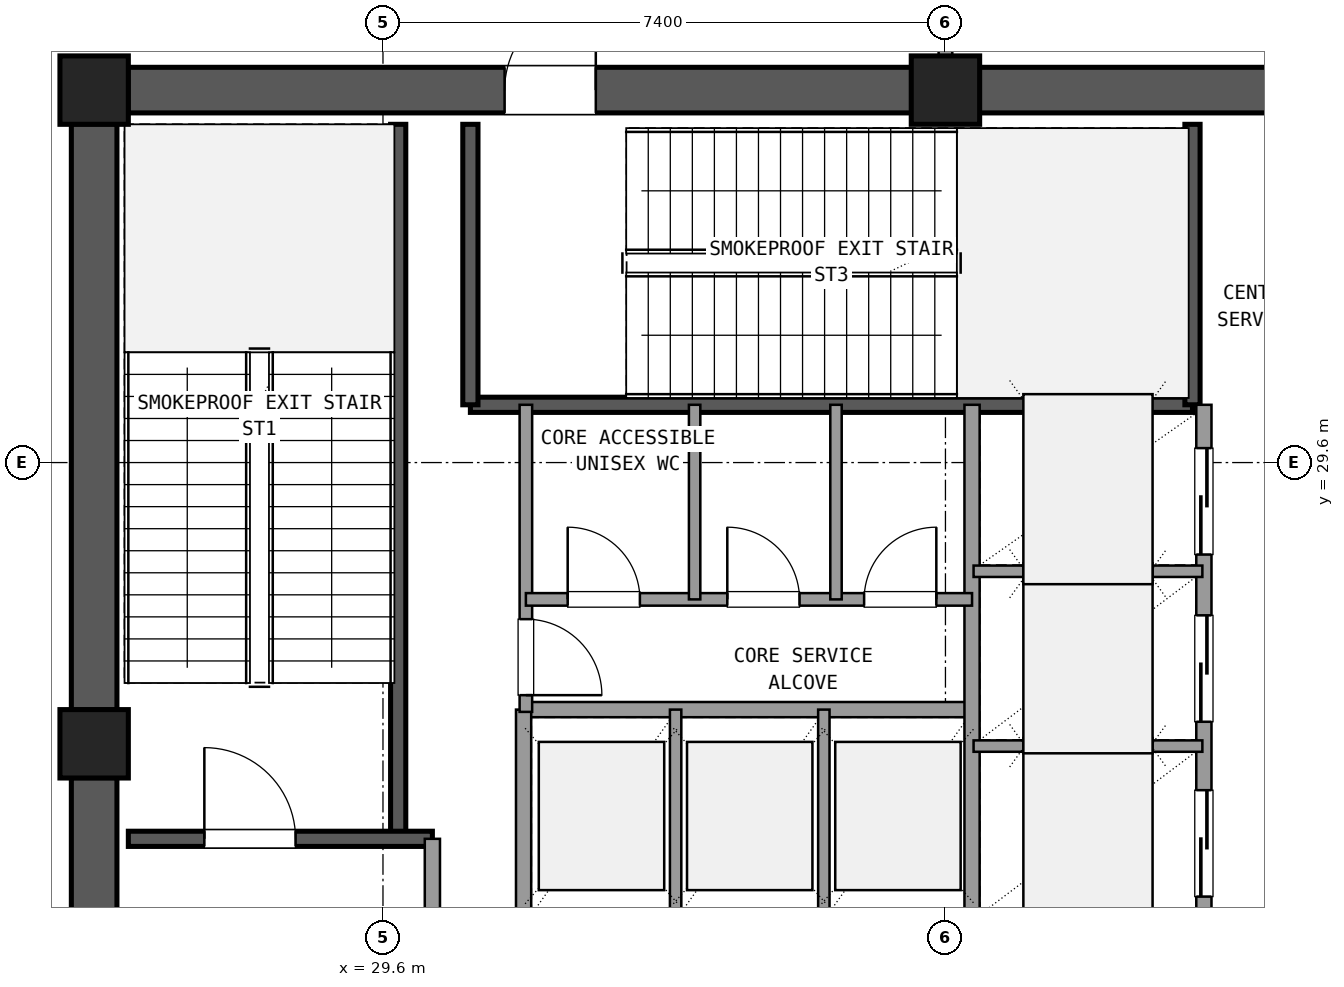
"""IFC4 building model, lengths in metres.
Left out: names, types, materials, properties, quantities, classifications, styles, units other than length and angle.
Written with IfcOpenShell. Run it as: python <this file> out.ifc"""

import sys

from ifc_helpers import new_model, si_unit, direction, frame, frame_2d, origin, origin_2d, place, context, subcontext, project, spatial, rectangle, extrude, element, fill, save


model = new_model("IFC4")
c1 = context("Model", 3, precision=1e-05, world=origin(), true_north=direction((0.0, 1.0)))
c2 = subcontext(c1, "Body", "Model", "MODEL_VIEW")
j1 = project(units=[si_unit("LENGTHUNIT", "METRE"), si_unit("PLANEANGLEUNIT", "RADIAN")], contexts=[c1])
p1 = place(None, origin())
s1 = spatial("IfcSite", under=j1, at=p1, CompositionType="ELEMENT")
p2 = place(p1, origin())
s2 = spatial("IfcBuilding", under=s1, at=p2, CompositionType="ELEMENT")
p3 = place(p2, frame((0.0, 0.0, 182.7)))
s3 = spatial("IfcBuildingStorey", under=s2, at=p3, CompositionType="ELEMENT", Elevation=182.7)
for number, where, z_axis, x_axis in (
    (1, (37.0, 34.5, 0.0), (0.0, 0.0, 1.0), (1.0, 0.0, 0.0)),
    (2, (25.8, 34.5, 0.0), (0.0, 0.0, 1.0), (1.0, 0.0, 0.0)),
    (3, (25.8, 25.9, 0.0), (0.0, 0.0, 1.0), (1.0, 0.0, 0.0)),
):
    element("IfcColumn", number, at=place(p3, frame(where, z_axis=z_axis, x_axis=x_axis)), inside=s3, PredefinedType="COLUMN", context=c2, shape_type="SweptSolid", body=[
        extrude(rectangle(XDim=0.9, YDim=0.9, at=origin_2d()), origin(), (0.0, 0.0, 1.0), 5.76),
    ])
p4 = place(p3, frame((47.755, 34.5, 0.0), z_axis=(0.0, 0.0, 1.0), x_axis=(-1.0, 0.0, 0.0)))
e4 = element("IfcWall", 4, at=p4, inside=s3, PredefinedType="SHEAR", context=c2, shape_type="SweptSolid", body=[
    extrude(rectangle(XDim=10.31, YDim=0.6, at=frame_2d((5.155, 0.0))), origin(), (0.0, 0.0, 1.0), 5.46),
])
p5 = place(p4, frame((4.655, 0.0, 0.0)))
e5 = element("IfcOpeningElement", 5, at=p5, cuts=e4, PredefinedType="OPENING", context=c2, shape_type="SweptSolid", body=[
    extrude(rectangle(XDim=1.6, YDim=2.2, at=frame_2d((0.8, 1.1))), frame((0.0, 0.31, 0.0), z_axis=(0.0, -1.0, 0.0), x_axis=(1.0, 0.0, 0.0)), (0.0, 0.0, 1.0), 0.62),
])
p6 = place(p3, frame((36.555, 34.5, 0.0), z_axis=(0.0, 0.0, 1.0), x_axis=(-1.0, 0.0, 0.0)))
e6 = element("IfcWall", 6, at=p6, inside=s3, PredefinedType="SHEAR", context=c2, shape_type="SweptSolid", body=[
    extrude(rectangle(XDim=10.31, YDim=0.6, at=frame_2d((5.155, 0.0))), origin(), (0.0, 0.0, 1.0), 5.46),
])
p7 = place(p6, frame((4.155, 0.0, 0.0)))
e7 = element("IfcOpeningElement", 7, at=p7, cuts=e6, PredefinedType="OPENING", context=c2, shape_type="SweptSolid", body=[
    extrude(rectangle(XDim=1.2, YDim=2.15, at=frame_2d((0.6, 1.075))), frame((0.0, 0.31, 0.0), z_axis=(0.0, -1.0, 0.0), x_axis=(1.0, 0.0, 0.0)), (0.0, 0.0, 1.0), 0.62),
])
p8 = place(p3, frame((25.8, 34.055, 0.0), z_axis=(0.0, 0.0, 1.0), x_axis=(0.0, -1.0, 0.0)))
e8 = element("IfcWall", 8, at=p8, inside=s3, PredefinedType="SHEAR", context=c2, shape_type="SweptSolid", body=[
    extrude(rectangle(XDim=7.71, YDim=0.6, at=frame_2d((3.855, 0.0))), origin(), (0.0, 0.0, 1.0), 5.46),
])
p9 = place(p3, frame((25.8, 25.455, 0.0), z_axis=(0.0, 0.0, 1.0), x_axis=(0.0, -1.0, 0.0)))
e9 = element("IfcWall", 9, at=p9, inside=s3, PredefinedType="SHEAR", context=c2, shape_type="SweptSolid", body=[
    extrude(rectangle(XDim=7.71, YDim=0.6, at=frame_2d((3.855, 0.0))), origin(), (0.0, 0.0, 1.0), 5.46),
])
p10 = place(p9, frame((2.205, 0.0, 0.0)))
e10 = element("IfcOpeningElement", 10, at=p10, cuts=e9, PredefinedType="OPENING", context=c2, shape_type="SweptSolid", body=[
    extrude(rectangle(XDim=1.2, YDim=2.15, at=frame_2d((0.6, 1.075))), frame((0.0, 0.31, 0.0), z_axis=(0.0, -1.0, 0.0), x_axis=(1.0, 0.0, 0.0)), (0.0, 0.0, 1.0), 0.62),
])
p11 = place(p3, frame((29.8, 24.65, 0.0), z_axis=(0.0, 0.0, 1.0), x_axis=(0.0, 1.0, 0.0)))
e11 = element("IfcWall", 11, at=p11, inside=s3, PredefinedType="SHEAR", context=c2, shape_type="SweptSolid", body=[
    extrude(rectangle(XDim=9.4, YDim=0.2, at=frame_2d((4.7, 0.0))), origin(), (0.0, 0.0, 1.0), 5.46),
])
p12 = place(p3, frame((26.25, 24.65, 0.0), z_axis=(0.0, 0.0, 1.0), x_axis=(1.0, 0.0, 0.0)))
e12 = element("IfcWall", 12, at=p12, inside=s3, PredefinedType="SHEAR", context=c2, shape_type="SweptSolid", body=[
    extrude(rectangle(XDim=4.0, YDim=0.2, at=frame_2d((2.0, 0.0))), origin(), (0.0, 0.0, 1.0), 5.46),
])
p13 = place(p12, frame((1.0, 0.0, 0.0)))
e13 = element("IfcOpeningElement", 13, at=p13, cuts=e12, PredefinedType="OPENING", context=c2, shape_type="SweptSolid", body=[
    extrude(rectangle(XDim=1.2, YDim=2.15, at=frame_2d((0.6, 1.075))), frame((0.0, 0.11, 0.0), z_axis=(0.0, -1.0, 0.0), x_axis=(1.0, 0.0, 0.0)), (0.0, 0.0, 1.0), 0.22),
])
p14 = place(p3, frame((30.75, 30.36, 0.0), z_axis=(0.0, 0.0, 1.0), x_axis=(1.0, 0.0, 0.0)))
e14 = element("IfcWall", 14, at=p14, inside=s3, PredefinedType="SHEAR", context=c2, shape_type="SweptSolid", body=[
    extrude(rectangle(XDim=9.5, YDim=0.2, at=frame_2d((4.75, 0.0))), origin(), (0.0, 0.0, 1.0), 5.46),
])
for number, where, z_axis, x_axis in (
    (15, (30.75, 30.36, 0.0), (0.0, 0.0, 1.0), (0.0, 1.0, 0.0)),
    (16, (40.25, 30.36, 0.0), (0.0, 0.0, 1.0), (0.0, 1.0, 0.0)),
):
    element("IfcWall", number, at=place(p3, frame(where, z_axis=z_axis, x_axis=x_axis)), inside=s3, PredefinedType="SHEAR", context=c2, shape_type="SweptSolid", body=[
        extrude(rectangle(XDim=3.69, YDim=0.2, at=frame_2d((1.845, 0.0))), origin(), (0.0, 0.0, 1.0), 5.46),
    ])
p15 = place(p3, frame((30.25, 17.75, 0.0), z_axis=(0.0, 0.0, 1.0), x_axis=(0.0, 1.0, 0.0)))
e17 = element("IfcWall", 17, at=p15, inside=s3, PredefinedType="SOLIDWALL", context=c2, shape_type="SweptSolid", body=[
    extrude(rectangle(XDim=6.9, YDim=0.2, at=frame_2d((3.45, 0.0))), origin(), (0.0, 0.0, 1.0), 4.37),
])
p16 = place(p15, frame((4.15, 0.0, 0.0)))
e18 = element("IfcOpeningElement", 18, at=p16, cuts=e17, PredefinedType="OPENING", context=c2, shape_type="SweptSolid", body=[
    extrude(rectangle(XDim=1.2, YDim=2.15, at=frame_2d((0.6, 1.075))), frame((0.0, 0.11, 0.0), z_axis=(0.0, -1.0, 0.0), x_axis=(1.0, 0.0, 0.0)), (0.0, 0.0, 1.0), 0.22),
])
p17 = place(p3, frame((31.45, 26.35, 0.0), z_axis=(0.0, 0.0, 1.0), x_axis=(1.0, 0.0, 0.0)))
e19 = element("IfcWall", 19, at=p17, inside=s3, PredefinedType="SOLIDWALL", context=c2, shape_type="SweptSolid", body=[
    extrude(rectangle(XDim=5.9, YDim=0.2, at=frame_2d((2.95, 0.0))), origin(), (0.0, 0.0, 1.0), 4.37),
])
p18 = place(p3, frame((31.45, 23.54, 0.0), z_axis=(0.0, 0.0, 1.0), x_axis=(0.0, 1.0, 0.0)))
e20 = element("IfcWall", 20, at=p18, inside=s3, PredefinedType="SOLIDWALL", context=c2, shape_type="SweptSolid", body=[
    extrude(rectangle(XDim=2.81, YDim=0.2, at=frame_2d((1.405, 0.0))), origin(), (0.0, 0.0, 1.0), 4.37),
])
for number, where, z_axis, x_axis in (
    (21, (33.45, 23.54, 0.0), (0.0, 0.0, 1.0), (0.0, 1.0, 0.0)),
    (22, (35.4, 23.54, 0.0), (0.0, 0.0, 1.0), (0.0, 1.0, 0.0)),
):
    element("IfcWall", number, at=place(p3, frame(where, z_axis=z_axis, x_axis=x_axis)), inside=s3, PredefinedType="PARTITIONING", context=c2, shape_type="SweptSolid", body=[
        extrude(rectangle(XDim=2.81, YDim=0.15, at=frame_2d((1.405, 0.0))), origin(), (0.0, 0.0, 1.0), 4.37),
    ])
p19 = place(p3, frame((37.35, 23.54, 0.0), z_axis=(0.0, 0.0, 1.0), x_axis=(0.0, 1.0, 0.0)))
e23 = element("IfcWall", 23, at=p19, inside=s3, PredefinedType="SOLIDWALL", context=c2, shape_type="SweptSolid", body=[
    extrude(rectangle(XDim=6.82, YDim=0.2, at=frame_2d((3.41, 0.0))), origin(), (0.0, 0.0, 1.0), 4.37),
])
p20 = place(p3, frame((40.4, 23.54, 0.0), z_axis=(0.0, 0.0, 1.0), x_axis=(0.0, 1.0, 0.0)))
e24 = element("IfcWall", 24, at=p20, inside=s3, PredefinedType="SOLIDWALL", context=c2, shape_type="SweptSolid", body=[
    extrude(rectangle(XDim=6.82, YDim=0.2, at=frame_2d((3.41, 0.0))), origin(), (0.0, 0.0, 1.0), 4.37),
])
p21 = place(p20, frame((0.35, 0.0, 0.0)))
e25 = element("IfcOpeningElement", 25, at=p21, cuts=e24, PredefinedType="OPENING", context=c2, shape_type="SweptSolid", body=[
    extrude(rectangle(XDim=1.4, YDim=2.2, at=frame_2d((0.7, 1.1))), frame((0.0, 0.11, 0.0), z_axis=(0.0, -1.0, 0.0), x_axis=(1.0, 0.0, 0.0)), (0.0, 0.0, 1.0), 0.22),
])
p22 = place(p20, frame((2.65, 0.0, 0.0)))
e26 = element("IfcOpeningElement", 26, at=p22, cuts=e24, PredefinedType="OPENING", context=c2, shape_type="SweptSolid", body=[
    extrude(rectangle(XDim=1.4, YDim=2.2, at=frame_2d((0.7, 1.1))), frame((0.0, 0.11, 0.0), z_axis=(0.0, -1.0, 0.0), x_axis=(1.0, 0.0, 0.0)), (0.0, 0.0, 1.0), 0.22),
])
p23 = place(p20, frame((4.85, 0.0, 0.0)))
e27 = element("IfcOpeningElement", 27, at=p23, cuts=e24, PredefinedType="OPENING", context=c2, shape_type="SweptSolid", body=[
    extrude(rectangle(XDim=1.4, YDim=2.2, at=frame_2d((0.7, 1.1))), frame((0.0, 0.11, 0.0), z_axis=(0.0, -1.0, 0.0), x_axis=(1.0, 0.0, 0.0)), (0.0, 0.0, 1.0), 0.22),
])
for number, where, z_axis, x_axis in (
    (28, (37.37, 25.87, 0.0), (0.0, 0.0, 1.0), (1.0, 0.0, 0.0)),
    (29, (37.37, 28.17, 0.0), (0.0, 0.0, 1.0), (1.0, 0.0, 0.0)),
):
    element("IfcWall", number, at=place(p3, frame(where, z_axis=z_axis, x_axis=x_axis)), inside=s3, PredefinedType="PARTITIONING", context=c2, shape_type="SweptSolid", body=[
        extrude(rectangle(XDim=3.01, YDim=0.15, at=frame_2d((1.505, 0.0))), origin(), (0.0, 0.0, 1.0), 4.37),
    ])
p24 = place(p3, frame((31.48, 26.32, 0.0), z_axis=(0.0, 0.0, 1.0), x_axis=(0.0, 1.0, 0.0)))
e30 = element("IfcWall", 30, at=p24, inside=s3, PredefinedType="PLUMBINGWALL", context=c2, shape_type="SweptSolid", body=[
    extrude(rectangle(XDim=4.04, YDim=0.165, at=frame_2d((2.02, 0.0))), origin(), (0.0, 0.0, 1.0), 4.37),
])
p25 = place(p24, frame((0.22, 0.0, 0.0)))
e31 = element("IfcOpeningElement", 31, at=p25, cuts=e30, PredefinedType="OPENING", context=c2, shape_type="SweptSolid", body=[
    extrude(rectangle(XDim=1.0, YDim=2.15, at=frame_2d((0.5, 1.075))), frame((0.0, 0.093, 0.0), z_axis=(0.0, -1.0, 0.0), x_axis=(1.0, 0.0, 0.0)), (0.0, 0.0, 1.0), 0.185),
])
p26 = place(p3, frame((31.48, 27.8, 0.0), z_axis=(0.0, 0.0, 1.0), x_axis=(1.0, 0.0, 0.0)))
e32 = element("IfcWall", 32, at=p26, inside=s3, PredefinedType="PLUMBINGWALL", context=c2, shape_type="SweptSolid", body=[
    extrude(rectangle(XDim=5.87, YDim=0.165, at=frame_2d((2.935, 0.0))), origin(), (0.0, 0.0, 1.0), 4.37),
])
p27 = place(p26, frame((0.55, 0.0, 0.0)))
e33 = element("IfcOpeningElement", 33, at=p27, cuts=e32, PredefinedType="OPENING", context=c2, shape_type="SweptSolid", body=[
    extrude(rectangle(XDim=0.95, YDim=2.1, at=frame_2d((0.475, 1.05))), frame((0.0, 0.093, 0.0), z_axis=(0.0, -1.0, 0.0), x_axis=(1.0, 0.0, 0.0)), (0.0, 0.0, 1.0), 0.185),
])
p28 = place(p26, frame((2.65, 0.0, 0.0)))
e34 = element("IfcOpeningElement", 34, at=p28, cuts=e32, PredefinedType="OPENING", context=c2, shape_type="SweptSolid", body=[
    extrude(rectangle(XDim=0.95, YDim=2.1, at=frame_2d((0.475, 1.05))), frame((0.0, 0.093, 0.0), z_axis=(0.0, -1.0, 0.0), x_axis=(1.0, 0.0, 0.0)), (0.0, 0.0, 1.0), 0.185),
])
p29 = place(p26, frame((4.45, 0.0, 0.0)))
e35 = element("IfcOpeningElement", 35, at=p29, cuts=e32, PredefinedType="OPENING", context=c2, shape_type="SweptSolid", body=[
    extrude(rectangle(XDim=0.95, YDim=2.1, at=frame_2d((0.475, 1.05))), frame((0.0, 0.093, 0.0), z_axis=(0.0, -1.0, 0.0), x_axis=(1.0, 0.0, 0.0)), (0.0, 0.0, 1.0), 0.185),
])
for number, where, z_axis, x_axis in (
    (36, (33.7, 27.8, 0.0), (0.0, 0.0, 1.0), (0.0, 1.0, 0.0)),
    (37, (35.56, 27.8, 0.0), (0.0, 0.0, 1.0), (0.0, 1.0, 0.0)),
):
    element("IfcWall", number, at=place(p3, frame(where, z_axis=z_axis, x_axis=x_axis)), inside=s3, PredefinedType="PARTITIONING", context=c2, shape_type="SweptSolid", body=[
        extrude(rectangle(XDim=2.56, YDim=0.15, at=frame_2d((1.28, 0.0))), origin(), (0.0, 0.0, 1.0), 4.37),
    ])
p30 = place(p3, frame((37.0, 34.95, 0.0), z_axis=(0.0, 0.0, 1.0), x_axis=(0.0, 1.0, 0.0)))
e38 = element("IfcWall", 38, at=p30, inside=s3, PredefinedType="PARTITIONING", context=c2, shape_type="SweptSolid", body=[
    extrude(rectangle(XDim=2.56, YDim=0.18, at=frame_2d((1.28, 0.0))), origin(), (0.0, 0.0, 1.0), 4.37),
])
p31 = place(p30, frame((0.28, 0.0, 0.0)))
e39 = element("IfcOpeningElement", 39, at=p31, cuts=e38, PredefinedType="OPENING", context=c2, shape_type="SweptSolid", body=[
    extrude(rectangle(XDim=2.0, YDim=2.2, at=frame_2d((1.0, 1.1))), frame((0.0, 0.1, 0.0), z_axis=(0.0, -1.0, 0.0), x_axis=(1.0, 0.0, 0.0)), (0.0, 0.0, 1.0), 0.2),
])
p32 = place(p13, origin())
e40 = element("IfcDoor", 40, at=p32, inside=s3, OperationType="SINGLE_SWING_LEFT", PredefinedType="DOOR", context=c2, shape_type="SweptSolid", body=[
    extrude(rectangle(XDim=1.2, YDim=2.15, at=frame_2d((0.6, 1.075))), frame((0.0, 0.025, 0.0), z_axis=(0.0, -1.0, 0.0), x_axis=(1.0, 0.0, 0.0)), (0.0, 0.0, 1.0), 0.05),
])
fill(e13, e40)
p33 = place(p7, frame((1.2, 0.0, 0.0), z_axis=(0.0, 0.0, 1.0), x_axis=(-1.0, 0.0, 0.0)))
e41 = element("IfcDoor", 41, at=p33, inside=s3, OperationType="SINGLE_SWING_LEFT", PredefinedType="DOOR", context=c2, shape_type="SweptSolid", body=[
    extrude(rectangle(XDim=1.2, YDim=2.15, at=frame_2d((0.6, 1.075))), frame((0.0, 0.025, 0.0), z_axis=(0.0, -1.0, 0.0), x_axis=(1.0, 0.0, 0.0)), (0.0, 0.0, 1.0), 0.05),
])
fill(e7, e41)
p34 = place(p21, origin())
e42 = element("IfcDoor", 42, at=p34, inside=s3, OperationType="SLIDING_TO_LEFT", PredefinedType="DOOR", context=c2, shape_type="SweptSolid", body=[
    extrude(rectangle(XDim=1.4, YDim=2.2, at=frame_2d((0.7, 1.1))), frame((0.0, 0.025, 0.0), z_axis=(0.0, -1.0, 0.0), x_axis=(1.0, 0.0, 0.0)), (0.0, 0.0, 1.0), 0.05),
])
fill(e25, e42)
p35 = place(p22, origin())
e43 = element("IfcDoor", 43, at=p35, inside=s3, OperationType="SLIDING_TO_LEFT", PredefinedType="DOOR", context=c2, shape_type="SweptSolid", body=[
    extrude(rectangle(XDim=1.4, YDim=2.2, at=frame_2d((0.7, 1.1))), frame((0.0, 0.025, 0.0), z_axis=(0.0, -1.0, 0.0), x_axis=(1.0, 0.0, 0.0)), (0.0, 0.0, 1.0), 0.05),
])
fill(e26, e43)
p36 = place(p23, origin())
e44 = element("IfcDoor", 44, at=p36, inside=s3, OperationType="SLIDING_TO_RIGHT", PredefinedType="DOOR", context=c2, shape_type="SweptSolid", body=[
    extrude(rectangle(XDim=1.4, YDim=2.2, at=frame_2d((0.7, 1.1))), frame((0.0, 0.025, 0.0), z_axis=(0.0, -1.0, 0.0), x_axis=(1.0, 0.0, 0.0)), (0.0, 0.0, 1.0), 0.05),
])
fill(e27, e44)
p37 = place(p25, frame((1.0, 0.0, 0.0), z_axis=(0.0, 0.0, 1.0), x_axis=(-1.0, 0.0, 0.0)))
e45 = element("IfcDoor", 45, at=p37, inside=s3, OperationType="SINGLE_SWING_LEFT", PredefinedType="DOOR", context=c2, shape_type="SweptSolid", body=[
    extrude(rectangle(XDim=1.0, YDim=2.15, at=frame_2d((0.5, 1.075))), frame((0.0, 0.025, 0.0), z_axis=(0.0, -1.0, 0.0), x_axis=(1.0, 0.0, 0.0)), (0.0, 0.0, 1.0), 0.05),
])
fill(e31, e45)
p38 = place(p27, origin())
e46 = element("IfcDoor", 46, at=p38, inside=s3, OperationType="SINGLE_SWING_LEFT", PredefinedType="DOOR", context=c2, shape_type="SweptSolid", body=[
    extrude(rectangle(XDim=0.95, YDim=2.1, at=frame_2d((0.475, 1.05))), frame((0.0, 0.025, 0.0), z_axis=(0.0, -1.0, 0.0), x_axis=(1.0, 0.0, 0.0)), (0.0, 0.0, 1.0), 0.05),
])
fill(e33, e46)
p39 = place(p28, origin())
e47 = element("IfcDoor", 47, at=p39, inside=s3, OperationType="SINGLE_SWING_LEFT", PredefinedType="DOOR", context=c2, shape_type="SweptSolid", body=[
    extrude(rectangle(XDim=0.95, YDim=2.1, at=frame_2d((0.475, 1.05))), frame((0.0, 0.025, 0.0), z_axis=(0.0, -1.0, 0.0), x_axis=(1.0, 0.0, 0.0)), (0.0, 0.0, 1.0), 0.05),
])
fill(e34, e47)
p40 = place(p29, origin())
e48 = element("IfcDoor", 48, at=p40, inside=s3, OperationType="SINGLE_SWING_RIGHT", PredefinedType="DOOR", context=c2, shape_type="SweptSolid", body=[
    extrude(rectangle(XDim=0.95, YDim=2.1, at=frame_2d((0.475, 1.05))), frame((0.0, 0.025, 0.0), z_axis=(0.0, -1.0, 0.0), x_axis=(1.0, 0.0, 0.0)), (0.0, 0.0, 1.0), 0.05),
])
fill(e35, e48)
save(model, sys.argv[1])
